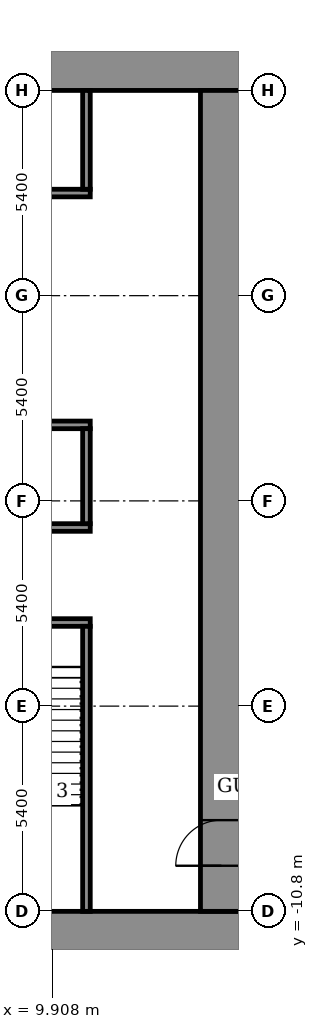
"""IFC4 building model, lengths in metres.
Left out: names, types, materials, properties, quantities, classifications, styles, units other than length and angle.
Written with IfcOpenShell. Run it as: python <this file> out.ifc"""

import sys

from ifc_helpers import new_model, si_unit, direction, frame, frame_2d, origin, place, context, subcontext, project, spatial, rectangle, extrude, element, fill, save


model = new_model("IFC4")
c1 = context("Model", 3, precision=1e-05, world=origin(), true_north=direction((0.0, 1.0)))
c2 = subcontext(c1, "Body", "Model", "MODEL_VIEW")
j1 = project(units=[si_unit("LENGTHUNIT", "METRE"), si_unit("PLANEANGLEUNIT", "RADIAN")], contexts=[c1])
p1 = place(None, origin())
s1 = spatial("IfcSite", under=j1, at=p1, CompositionType="ELEMENT")
p2 = place(p1, origin())
s2 = spatial("IfcBuilding", under=s1, at=p2, CompositionType="ELEMENT")
p3 = place(p2, frame((0.0, 0.0, 52.1)))
s3 = spatial("IfcBuildingStorey", under=s2, at=p3, CompositionType="ELEMENT", Elevation=52.1)
for number, where, z_axis, x_axis in (
    (1, (-14.9, -11.35, 0.0), (0.0, 0.0, 1.0), (1.0, 0.0, 0.0)),
    (2, (-14.9, 11.35, 0.0), (0.0, 0.0, 1.0), (1.0, 0.0, 0.0)),
):
    element("IfcWall", number, at=place(p3, frame(where, z_axis=z_axis, x_axis=x_axis)), inside=s3, PredefinedType="SHEAR", context=c2, shape_type="SweptSolid", body=[
        extrude(rectangle(XDim=29.8, YDim=1.1, at=frame_2d((14.9, 0.0))), origin(), (0.0, 0.0, 1.0), 4.6),
    ])
p4 = place(p3, frame((14.35, -10.8, 0.0), z_axis=(0.0, 0.0, 1.0), x_axis=(0.0, 1.0, 0.0)))
e3 = element("IfcWall", 3, at=p4, inside=s3, PredefinedType="SHEAR", context=c2, shape_type="SweptSolid", body=[
    extrude(rectangle(XDim=21.6, YDim=1.1, at=frame_2d((10.8, 0.0))), origin(), (0.0, 0.0, 1.0), 4.6),
])
p5 = place(p4, frame((1.2, 0.0, 0.0)))
e4 = element("IfcOpeningElement", 4, at=p5, cuts=e3, PredefinedType="OPENING", context=c2, shape_type="SweptSolid", body=[
    extrude(rectangle(XDim=1.2, YDim=2.1, at=frame_2d((0.6, 1.05))), frame((0.0, 0.56, 0.0), z_axis=(0.0, -1.0, 0.0), x_axis=(1.0, 0.0, 0.0)), (0.0, 0.0, 1.0), 1.12),
])
p6 = place(p3, frame((-10.9, -3.2, 0.0), z_axis=(0.0, 0.0, 1.0), x_axis=(1.0, 0.0, 0.0)))
e5 = element("IfcWall", 5, at=p6, inside=s3, PredefinedType="SHEAR", context=c2, shape_type="SweptSolid", body=[
    extrude(rectangle(XDim=21.8, YDim=0.2, at=frame_2d((10.9, 0.0))), origin(), (0.0, 0.0, 1.0), 4.05),
])
p7 = place(p6, frame((1.075, 0.0, 0.0)))
e6 = element("IfcOpeningElement", 6, at=p7, cuts=e5, PredefinedType="OPENING", context=c2, shape_type="SweptSolid", body=[
    extrude(rectangle(XDim=1.1, YDim=2.1, at=frame_2d((0.55, 1.05))), frame((0.0, 0.11, 0.0), z_axis=(0.0, -1.0, 0.0), x_axis=(1.0, 0.0, 0.0)), (0.0, 0.0, 1.0), 0.22),
])
p8 = place(p6, frame((10.325, 0.0, 0.0)))
e7 = element("IfcOpeningElement", 7, at=p8, cuts=e5, PredefinedType="OPENING", context=c2, shape_type="SweptSolid", body=[
    extrude(rectangle(XDim=1.1, YDim=2.1, at=frame_2d((0.55, 1.05))), frame((0.0, 0.11, 0.0), z_axis=(0.0, -1.0, 0.0), x_axis=(1.0, 0.0, 0.0)), (0.0, 0.0, 1.0), 0.22),
])
p9 = place(p6, frame((19.625, 0.0, 0.0)))
e8 = element("IfcOpeningElement", 8, at=p9, cuts=e5, PredefinedType="OPENING", context=c2, shape_type="SweptSolid", body=[
    extrude(rectangle(XDim=1.1, YDim=2.1, at=frame_2d((0.55, 1.05))), frame((0.0, 0.11, 0.0), z_axis=(0.0, -1.0, 0.0), x_axis=(1.0, 0.0, 0.0)), (0.0, 0.0, 1.0), 0.22),
])
p10 = place(p6, frame((5.7, 0.0, 0.0)))
e9 = element("IfcOpeningElement", 9, at=p10, cuts=e5, PredefinedType="OPENING", context=c2, shape_type="SweptSolid", body=[
    extrude(rectangle(XDim=1.1, YDim=2.1, at=frame_2d((0.55, 1.05))), frame((0.0, 0.11, 0.0), z_axis=(0.0, -1.0, 0.0), x_axis=(1.0, 0.0, 0.0)), (0.0, 0.0, 1.0), 0.22),
])
p11 = place(p6, frame((14.975, 0.0, 0.0)))
e10 = element("IfcOpeningElement", 10, at=p11, cuts=e5, PredefinedType="OPENING", context=c2, shape_type="SweptSolid", body=[
    extrude(rectangle(XDim=1.1, YDim=2.1, at=frame_2d((0.55, 1.05))), frame((0.0, 0.11, 0.0), z_axis=(0.0, -1.0, 0.0), x_axis=(1.0, 0.0, 0.0)), (0.0, 0.0, 1.0), 0.22),
])
p12 = place(p3, frame((-10.9, -0.7, 0.0), z_axis=(0.0, 0.0, 1.0), x_axis=(1.0, 0.0, 0.0)))
e11 = element("IfcWall", 11, at=p12, inside=s3, PredefinedType="SHEAR", context=c2, shape_type="SweptSolid", body=[
    extrude(rectangle(XDim=21.8, YDim=0.2, at=frame_2d((10.9, 0.0))), origin(), (0.0, 0.0, 1.0), 4.05),
])
p13 = place(p3, frame((-10.9, 2.0, 0.0), z_axis=(0.0, 0.0, 1.0), x_axis=(1.0, 0.0, 0.0)))
e12 = element("IfcWall", 12, at=p13, inside=s3, PredefinedType="SHEAR", context=c2, shape_type="SweptSolid", body=[
    extrude(rectangle(XDim=21.8, YDim=0.2, at=frame_2d((10.9, 0.0))), origin(), (0.0, 0.0, 1.0), 4.05),
])
p14 = place(p13, frame((0.9, 0.0, 0.0)))
e13 = element("IfcOpeningElement", 13, at=p14, cuts=e12, PredefinedType="OPENING", context=c2, shape_type="SweptSolid", body=[
    extrude(rectangle(XDim=1.1, YDim=2.1, at=frame_2d((0.55, 1.05))), frame((0.0, 0.11, 0.0), z_axis=(0.0, -1.0, 0.0), x_axis=(1.0, 0.0, 0.0)), (0.0, 0.0, 1.0), 0.22),
])
p15 = place(p13, frame((3.6, 0.0, 0.0)))
e14 = element("IfcOpeningElement", 14, at=p15, cuts=e12, PredefinedType="OPENING", context=c2, shape_type="SweptSolid", body=[
    extrude(rectangle(XDim=1.1, YDim=2.1, at=frame_2d((0.55, 1.05))), frame((0.0, 0.11, 0.0), z_axis=(0.0, -1.0, 0.0), x_axis=(1.0, 0.0, 0.0)), (0.0, 0.0, 1.0), 0.22),
])
p16 = place(p13, frame((6.3, 0.0, 0.0)))
e15 = element("IfcOpeningElement", 15, at=p16, cuts=e12, PredefinedType="OPENING", context=c2, shape_type="SweptSolid", body=[
    extrude(rectangle(XDim=1.1, YDim=2.1, at=frame_2d((0.55, 1.05))), frame((0.0, 0.11, 0.0), z_axis=(0.0, -1.0, 0.0), x_axis=(1.0, 0.0, 0.0)), (0.0, 0.0, 1.0), 0.22),
])
p17 = place(p13, frame((9.0, 0.0, 0.0)))
e16 = element("IfcOpeningElement", 16, at=p17, cuts=e12, PredefinedType="OPENING", context=c2, shape_type="SweptSolid", body=[
    extrude(rectangle(XDim=1.1, YDim=2.1, at=frame_2d((0.55, 1.05))), frame((0.0, 0.11, 0.0), z_axis=(0.0, -1.0, 0.0), x_axis=(1.0, 0.0, 0.0)), (0.0, 0.0, 1.0), 0.22),
])
p18 = place(p13, frame((11.7, 0.0, 0.0)))
e17 = element("IfcOpeningElement", 17, at=p18, cuts=e12, PredefinedType="OPENING", context=c2, shape_type="SweptSolid", body=[
    extrude(rectangle(XDim=1.1, YDim=2.1, at=frame_2d((0.55, 1.05))), frame((0.0, 0.11, 0.0), z_axis=(0.0, -1.0, 0.0), x_axis=(1.0, 0.0, 0.0)), (0.0, 0.0, 1.0), 0.22),
])
p19 = place(p13, frame((14.5, 0.0, 0.0)))
e18 = element("IfcOpeningElement", 18, at=p19, cuts=e12, PredefinedType="OPENING", context=c2, shape_type="SweptSolid", body=[
    extrude(rectangle(XDim=0.9, YDim=2.1, at=frame_2d((0.45, 1.05))), frame((0.0, 0.11, 0.0), z_axis=(0.0, -1.0, 0.0), x_axis=(1.0, 0.0, 0.0)), (0.0, 0.0, 1.0), 0.22),
])
p20 = place(p13, frame((18.55, 0.0, 0.0)))
e19 = element("IfcOpeningElement", 19, at=p20, cuts=e12, PredefinedType="OPENING", context=c2, shape_type="SweptSolid", body=[
    extrude(rectangle(XDim=0.9, YDim=2.1, at=frame_2d((0.45, 1.05))), frame((0.0, 0.11, 0.0), z_axis=(0.0, -1.0, 0.0), x_axis=(1.0, 0.0, 0.0)), (0.0, 0.0, 1.0), 0.22),
])
p21 = place(p3, frame((-10.9, 8.1, 0.0), z_axis=(0.0, 0.0, 1.0), x_axis=(1.0, 0.0, 0.0)))
e20 = element("IfcWall", 20, at=p21, inside=s3, PredefinedType="SHEAR", context=c2, shape_type="SweptSolid", body=[
    extrude(rectangle(XDim=21.8, YDim=0.2, at=frame_2d((10.9, 0.0))), origin(), (0.0, 0.0, 1.0), 4.05),
])
p22 = place(p21, frame((0.9, 0.0, 0.0)))
e21 = element("IfcOpeningElement", 21, at=p22, cuts=e20, PredefinedType="OPENING", context=c2, shape_type="SweptSolid", body=[
    extrude(rectangle(XDim=1.1, YDim=2.1, at=frame_2d((0.55, 1.05))), frame((0.0, 0.11, 0.0), z_axis=(0.0, -1.0, 0.0), x_axis=(1.0, 0.0, 0.0)), (0.0, 0.0, 1.0), 0.22),
])
p23 = place(p21, frame((3.6, 0.0, 0.0)))
e22 = element("IfcOpeningElement", 22, at=p23, cuts=e20, PredefinedType="OPENING", context=c2, shape_type="SweptSolid", body=[
    extrude(rectangle(XDim=1.1, YDim=2.1, at=frame_2d((0.55, 1.05))), frame((0.0, 0.11, 0.0), z_axis=(0.0, -1.0, 0.0), x_axis=(1.0, 0.0, 0.0)), (0.0, 0.0, 1.0), 0.22),
])
p24 = place(p21, frame((6.3, 0.0, 0.0)))
e23 = element("IfcOpeningElement", 23, at=p24, cuts=e20, PredefinedType="OPENING", context=c2, shape_type="SweptSolid", body=[
    extrude(rectangle(XDim=1.1, YDim=2.1, at=frame_2d((0.55, 1.05))), frame((0.0, 0.11, 0.0), z_axis=(0.0, -1.0, 0.0), x_axis=(1.0, 0.0, 0.0)), (0.0, 0.0, 1.0), 0.22),
])
p25 = place(p21, frame((9.0, 0.0, 0.0)))
e24 = element("IfcOpeningElement", 24, at=p25, cuts=e20, PredefinedType="OPENING", context=c2, shape_type="SweptSolid", body=[
    extrude(rectangle(XDim=1.1, YDim=2.1, at=frame_2d((0.55, 1.05))), frame((0.0, 0.11, 0.0), z_axis=(0.0, -1.0, 0.0), x_axis=(1.0, 0.0, 0.0)), (0.0, 0.0, 1.0), 0.22),
])
p26 = place(p21, frame((11.7, 0.0, 0.0)))
e25 = element("IfcOpeningElement", 25, at=p26, cuts=e20, PredefinedType="OPENING", context=c2, shape_type="SweptSolid", body=[
    extrude(rectangle(XDim=1.1, YDim=2.1, at=frame_2d((0.55, 1.05))), frame((0.0, 0.11, 0.0), z_axis=(0.0, -1.0, 0.0), x_axis=(1.0, 0.0, 0.0)), (0.0, 0.0, 1.0), 0.22),
])
p27 = place(p21, frame((14.5, 0.0, 0.0)))
e26 = element("IfcOpeningElement", 26, at=p27, cuts=e20, PredefinedType="OPENING", context=c2, shape_type="SweptSolid", body=[
    extrude(rectangle(XDim=0.9, YDim=2.1, at=frame_2d((0.45, 1.05))), frame((0.0, 0.11, 0.0), z_axis=(0.0, -1.0, 0.0), x_axis=(1.0, 0.0, 0.0)), (0.0, 0.0, 1.0), 0.22),
])
p28 = place(p21, frame((18.55, 0.0, 0.0)))
e27 = element("IfcOpeningElement", 27, at=p28, cuts=e20, PredefinedType="OPENING", context=c2, shape_type="SweptSolid", body=[
    extrude(rectangle(XDim=0.9, YDim=2.1, at=frame_2d((0.45, 1.05))), frame((0.0, 0.11, 0.0), z_axis=(0.0, -1.0, 0.0), x_axis=(1.0, 0.0, 0.0)), (0.0, 0.0, 1.0), 0.22),
])
p29 = place(p3, frame((10.8, -10.8, 0.0), z_axis=(0.0, 0.0, 1.0), x_axis=(0.0, 1.0, 0.0)))
e28 = element("IfcWall", 28, at=p29, inside=s3, PredefinedType="SHEAR", context=c2, shape_type="SweptSolid", body=[
    extrude(rectangle(XDim=7.5, YDim=0.2, at=frame_2d((3.75, 0.0))), origin(), (0.0, 0.0, 1.0), 4.05),
])
p30 = place(p3, frame((10.8, -0.6, 0.0), z_axis=(0.0, 0.0, 1.0), x_axis=(0.0, 1.0, 0.0)))
e29 = element("IfcWall", 29, at=p30, inside=s3, PredefinedType="STANDARD", context=c2, shape_type="SweptSolid", body=[
    extrude(rectangle(XDim=2.5, YDim=0.2, at=frame_2d((1.25, 0.0))), origin(), (0.0, 0.0, 1.0), 4.05),
])
p31 = place(p3, frame((10.8, 8.2, 0.0), z_axis=(0.0, 0.0, 1.0), x_axis=(0.0, 1.0, 0.0)))
e30 = element("IfcWall", 30, at=p31, inside=s3, PredefinedType="STANDARD", context=c2, shape_type="SweptSolid", body=[
    extrude(rectangle(XDim=2.6, YDim=0.2, at=frame_2d((1.3, 0.0))), origin(), (0.0, 0.0, 1.0), 4.05),
])
p32 = place(p5, origin())
e31 = element("IfcDoor", 31, at=p32, inside=s3, OperationType="DOUBLE_DOOR_SINGLE_SWING", PredefinedType="DOOR", context=c2, shape_type="SweptSolid", body=[
    extrude(rectangle(XDim=1.2, YDim=2.1, at=frame_2d((0.6, 1.05))), frame((0.0, 0.025, 0.0), z_axis=(0.0, -1.0, 0.0), x_axis=(1.0, 0.0, 0.0)), (0.0, 0.0, 1.0), 0.05),
])
fill(e4, e31)
save(model, sys.argv[1])
